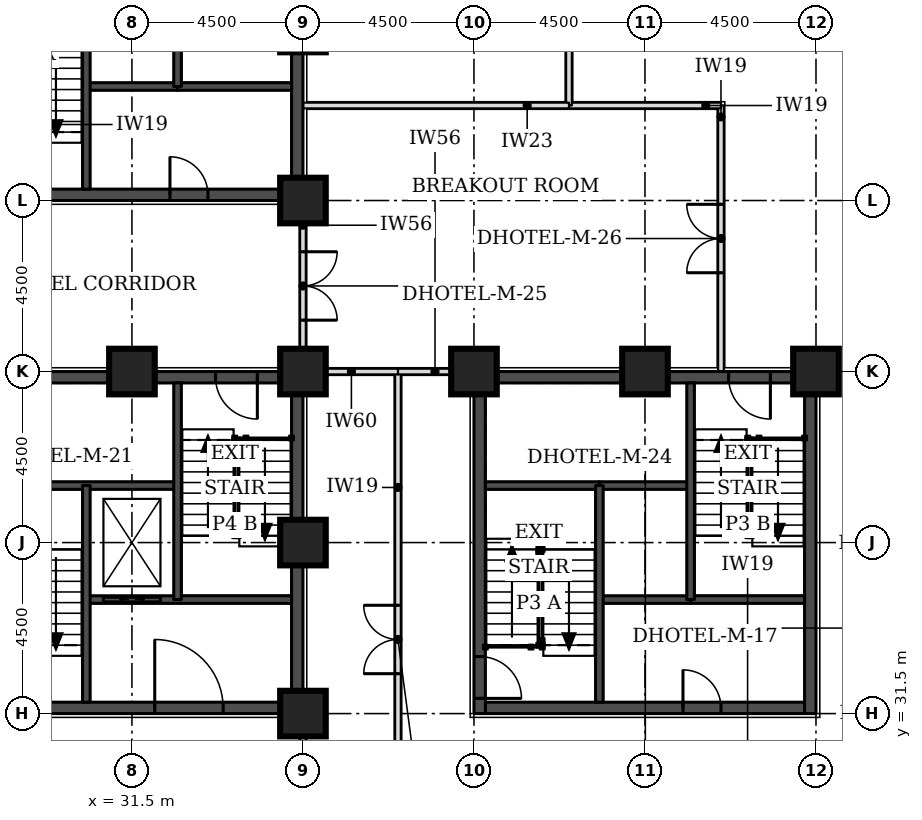
"""IFC4 building model, lengths in metres.
Left out: names, types, materials, properties, quantities, classifications, styles, units other than length and angle.
Written with IfcOpenShell. Run it as: python <this file> out.ifc"""

import sys

from ifc_helpers import new_model, si_unit, direction, frame, frame_2d, origin, origin_2d, place, context, subcontext, project, spatial, rectangle, extrude, element, fill, save


model = new_model("IFC4")
c1 = context("Model", 3, precision=1e-05, world=origin(), true_north=direction((0.0, 1.0)))
c2 = subcontext(c1, "Body", "Model", "MODEL_VIEW")
j1 = project(units=[si_unit("LENGTHUNIT", "METRE"), si_unit("PLANEANGLEUNIT", "RADIAN")], contexts=[c1])
p1 = place(None, origin())
s1 = spatial("IfcSite", under=j1, at=p1, CompositionType="ELEMENT")
p2 = place(p1, origin())
s2 = spatial("IfcBuilding", under=s1, at=p2, CompositionType="ELEMENT")
p3 = place(p2, frame((0.0, 0.0, 23.1)))
s3 = spatial("IfcBuildingStorey", under=s2, at=p3, CompositionType="ELEMENT", Elevation=23.1)
for number, where, z_axis, x_axis in (
    (1, (36.0, 31.5, 0.0), (0.0, 0.0, 1.0), (1.0, 0.0, 0.0)),
    (2, (36.0, 36.0, 0.0), (0.0, 0.0, 1.0), (1.0, 0.0, 0.0)),
    (3, (31.5, 40.5, 0.0), (0.0, 0.0, 1.0), (1.0, 0.0, 0.0)),
    (4, (36.0, 40.5, 0.0), (0.0, 0.0, 1.0), (1.0, 0.0, 0.0)),
    (5, (40.5, 40.5, 0.0), (0.0, 0.0, 1.0), (1.0, 0.0, 0.0)),
    (6, (45.0, 40.5, 0.0), (0.0, 0.0, 1.0), (1.0, 0.0, 0.0)),
    (7, (49.5, 40.5, 0.0), (0.0, 0.0, 1.0), (1.0, 0.0, 0.0)),
    (8, (36.0, 45.0, 0.0), (0.0, 0.0, 1.0), (1.0, 0.0, 0.0)),
):
    element("IfcColumn", number, at=place(p3, frame(where, z_axis=z_axis, x_axis=x_axis)), inside=s3, PredefinedType="COLUMN", context=c2, shape_type="SweptSolid", body=[
        extrude(rectangle(XDim=1.2, YDim=1.2, at=origin_2d()), origin(), (0.0, 0.0, 1.0), 3.3),
    ])
p4 = place(p3, frame((27.3, 45.15, 0.0), z_axis=(0.0, 0.0, 1.0), x_axis=(1.0, 0.0, 0.0)))
e9 = element("IfcWall", 9, at=p4, inside=s3, PredefinedType="SHEAR", context=c2, shape_type="SweptSolid", body=[
    extrude(rectangle(XDim=8.4, YDim=0.3, at=frame_2d((4.2, 0.0))), origin(), (0.0, 0.0, 1.0), 3.3),
])
p5 = place(p4, frame((5.2, 0.0, 0.0)))
e10 = element("IfcOpeningElement", 10, at=p5, cuts=e9, PredefinedType="OPENING", context=c2, shape_type="SweptSolid", body=[
    extrude(rectangle(XDim=1.0, YDim=2.1, at=frame_2d((0.5, 1.05))), frame((0.0, 0.16, 0.0), z_axis=(0.0, -1.0, 0.0), x_axis=(1.0, 0.0, 0.0)), (0.0, 0.0, 1.0), 0.32),
])
p6 = place(p3, frame((35.85, 45.0, 0.0), z_axis=(0.0, 0.0, 1.0), x_axis=(0.0, 1.0, 0.0)))
e11 = element("IfcWall", 11, at=p6, inside=s3, PredefinedType="SHEAR", context=c2, shape_type="SweptSolid", body=[
    extrude(rectangle(XDim=9.0, YDim=0.3, at=frame_2d((4.5, 0.0))), origin(), (0.0, 0.0, 1.0), 3.3),
])
p7 = place(p3, frame((40.8, 31.65, 0.0), z_axis=(0.0, 0.0, 1.0), x_axis=(1.0, 0.0, 0.0)))
e12 = element("IfcWall", 12, at=p7, inside=s3, PredefinedType="SHEAR", context=c2, shape_type="SweptSolid", body=[
    extrude(rectangle(XDim=8.4, YDim=0.3, at=frame_2d((4.2, 0.0))), origin(), (0.0, 0.0, 1.0), 3.3),
])
p8 = place(p7, frame((5.2, 0.0, 0.0)))
e13 = element("IfcOpeningElement", 13, at=p8, cuts=e12, PredefinedType="OPENING", context=c2, shape_type="SweptSolid", body=[
    extrude(rectangle(XDim=1.0, YDim=2.1, at=frame_2d((0.5, 1.05))), frame((0.0, 0.16, 0.0), z_axis=(0.0, -1.0, 0.0), x_axis=(1.0, 0.0, 0.0)), (0.0, 0.0, 1.0), 0.32),
])
p9 = place(p3, frame((40.8, 40.35, 0.0), z_axis=(0.0, 0.0, 1.0), x_axis=(1.0, 0.0, 0.0)))
e14 = element("IfcWall", 14, at=p9, inside=s3, PredefinedType="SHEAR", context=c2, shape_type="SweptSolid", body=[
    extrude(rectangle(XDim=8.4, YDim=0.3, at=frame_2d((4.2, 0.0))), origin(), (0.0, 0.0, 1.0), 3.3),
])
p10 = place(p9, frame((6.4, 0.0, 0.0)))
e15 = element("IfcOpeningElement", 15, at=p10, cuts=e14, PredefinedType="OPENING", context=c2, shape_type="SweptSolid", body=[
    extrude(rectangle(XDim=1.1, YDim=2.1, at=frame_2d((0.55, 1.05))), frame((0.0, 0.16, 0.0), z_axis=(0.0, -1.0, 0.0), x_axis=(1.0, 0.0, 0.0)), (0.0, 0.0, 1.0), 0.32),
])
p11 = place(p3, frame((40.65, 31.5, 0.0), z_axis=(0.0, 0.0, 1.0), x_axis=(0.0, 1.0, 0.0)))
e16 = element("IfcWall", 16, at=p11, inside=s3, PredefinedType="SHEAR", context=c2, shape_type="SweptSolid", body=[
    extrude(rectangle(XDim=9.0, YDim=0.3, at=frame_2d((4.5, 0.0))), origin(), (0.0, 0.0, 1.0), 3.3),
])
p12 = place(p11, frame((0.4, 0.0, 0.0)))
e17 = element("IfcOpeningElement", 17, at=p12, cuts=e16, PredefinedType="OPENING", context=c2, shape_type="SweptSolid", body=[
    extrude(rectangle(XDim=1.1, YDim=2.1, at=frame_2d((0.55, 1.05))), frame((0.0, 0.16, 0.0), z_axis=(0.0, -1.0, 0.0), x_axis=(1.0, 0.0, 0.0)), (0.0, 0.0, 1.0), 0.32),
])
p13 = place(p3, frame((49.35, 31.5, 0.0), z_axis=(0.0, 0.0, 1.0), x_axis=(0.0, 1.0, 0.0)))
e18 = element("IfcWall", 18, at=p13, inside=s3, PredefinedType="SHEAR", context=c2, shape_type="SweptSolid", body=[
    extrude(rectangle(XDim=9.0, YDim=0.3, at=frame_2d((4.5, 0.0))), origin(), (0.0, 0.0, 1.0), 3.3),
])
p14 = place(p3, frame((27.3, 31.65, 0.0), z_axis=(0.0, 0.0, 1.0), x_axis=(1.0, 0.0, 0.0)))
e19 = element("IfcWall", 19, at=p14, inside=s3, PredefinedType="SHEAR", context=c2, shape_type="SweptSolid", body=[
    extrude(rectangle(XDim=8.4, YDim=0.3, at=frame_2d((4.2, 0.0))), origin(), (0.0, 0.0, 1.0), 3.3),
])
p15 = place(p14, frame((4.8, 0.0, 0.0)))
e20 = element("IfcOpeningElement", 20, at=p15, cuts=e19, PredefinedType="OPENING", context=c2, shape_type="SweptSolid", body=[
    extrude(rectangle(XDim=1.8, YDim=2.1, at=frame_2d((0.9, 1.05))), frame((0.0, 0.16, 0.0), z_axis=(0.0, -1.0, 0.0), x_axis=(1.0, 0.0, 0.0)), (0.0, 0.0, 1.0), 0.32),
])
p16 = place(p3, frame((27.3, 40.35, 0.0), z_axis=(0.0, 0.0, 1.0), x_axis=(1.0, 0.0, 0.0)))
e21 = element("IfcWall", 21, at=p16, inside=s3, PredefinedType="SHEAR", context=c2, shape_type="SweptSolid", body=[
    extrude(rectangle(XDim=8.4, YDim=0.3, at=frame_2d((4.2, 0.0))), origin(), (0.0, 0.0, 1.0), 3.3),
])
p17 = place(p16, frame((6.4, 0.0, 0.0)))
e22 = element("IfcOpeningElement", 22, at=p17, cuts=e21, PredefinedType="OPENING", context=c2, shape_type="SweptSolid", body=[
    extrude(rectangle(XDim=1.1, YDim=2.1, at=frame_2d((0.55, 1.05))), frame((0.0, 0.16, 0.0), z_axis=(0.0, -1.0, 0.0), x_axis=(1.0, 0.0, 0.0)), (0.0, 0.0, 1.0), 0.32),
])
p18 = place(p3, frame((35.85, 31.5, 0.0), z_axis=(0.0, 0.0, 1.0), x_axis=(0.0, 1.0, 0.0)))
e23 = element("IfcWall", 23, at=p18, inside=s3, PredefinedType="SHEAR", context=c2, shape_type="SweptSolid", body=[
    extrude(rectangle(XDim=9.0, YDim=0.3, at=frame_2d((4.5, 0.0))), origin(), (0.0, 0.0, 1.0), 3.3),
])
p19 = place(p3, frame((38.5, 26.4, 0.0), z_axis=(0.0, 0.0, 1.0), x_axis=(0.0, 1.0, 0.0)))
e24 = element("IfcWall", 24, at=p19, inside=s3, PredefinedType="PARTITIONING", context=c2, shape_type="SweptSolid", body=[
    extrude(rectangle(XDim=14.1, YDim=0.15, at=frame_2d((7.05, 0.0))), origin(), (0.0, 0.0, 1.0), 3.08),
])
p20 = place(p19, frame((6.15, 0.0, 0.0)))
e25 = element("IfcOpeningElement", 25, at=p20, cuts=e24, PredefinedType="OPENING", context=c2, shape_type="SweptSolid", body=[
    extrude(rectangle(XDim=1.8, YDim=2.1, at=frame_2d((0.9, 1.05))), frame((0.0, 0.085, 0.0), z_axis=(0.0, -1.0, 0.0), x_axis=(1.0, 0.0, 0.0)), (0.0, 0.0, 1.0), 0.17),
])
for number, where, z_axis, x_axis in (
    (26, (36.0, 29.5, 0.0), (0.0, 0.0, 1.0), (0.0, 1.0, 0.0)),
    (27, (38.5, 40.5, 0.0), (0.0, 0.0, 1.0), (1.0, 0.0, 0.0)),
):
    element("IfcWall", number, at=place(p3, frame(where, z_axis=z_axis, x_axis=x_axis)), inside=s3, PredefinedType="PARTITIONING", context=c2, shape_type="SweptSolid", body=[
        extrude(rectangle(XDim=1.95, YDim=0.15, at=frame_2d((0.975, 0.0))), origin(), (0.0, 0.0, 1.0), 2.33),
    ])
p21 = place(p3, frame((36.0, 40.55, 0.0), z_axis=(0.0, 0.0, 1.0), x_axis=(0.0, 1.0, 0.0)))
e28 = element("IfcWall", 28, at=p21, inside=s3, PredefinedType="PARTITIONING", context=c2, shape_type="SweptSolid", body=[
    extrude(rectangle(XDim=4.4, YDim=0.15, at=frame_2d((2.2, 0.0))), origin(), (0.0, 0.0, 1.0), 2.33),
])
p22 = place(p21, frame((1.302, 0.0, 0.0)))
e29 = element("IfcOpeningElement", 29, at=p22, cuts=e28, PredefinedType="OPENING", context=c2, shape_type="SweptSolid", body=[
    extrude(rectangle(XDim=1.8, YDim=2.1, at=frame_2d((0.9, 1.05))), frame((0.0, 0.085, 0.0), z_axis=(0.0, -1.0, 0.0), x_axis=(1.0, 0.0, 0.0)), (0.0, 0.0, 1.0), 0.17),
])
p23 = place(p3, frame((47.0, 40.5, 0.0), z_axis=(0.0, 0.0, 1.0), x_axis=(0.0, 1.0, 0.0)))
e30 = element("IfcWall", 30, at=p23, inside=s3, PredefinedType="PARTITIONING", context=c2, shape_type="SweptSolid", body=[
    extrude(rectangle(XDim=7.0, YDim=0.15, at=frame_2d((3.5, 0.0))), origin(), (0.0, 0.0, 1.0), 3.08),
])
p24 = place(p23, frame((2.6, 0.0, 0.0)))
e31 = element("IfcOpeningElement", 31, at=p24, cuts=e30, PredefinedType="OPENING", context=c2, shape_type="SweptSolid", body=[
    extrude(rectangle(XDim=1.8, YDim=2.1, at=frame_2d((0.9, 1.05))), frame((0.0, 0.085, 0.0), z_axis=(0.0, -1.0, 0.0), x_axis=(1.0, 0.0, 0.0)), (0.0, 0.0, 1.0), 0.17),
])
p25 = place(p3, frame((43.0, 47.5, 0.0), z_axis=(0.0, 0.0, 1.0), x_axis=(1.0, 0.0, 0.0)))
e32 = element("IfcWall", 32, at=p25, inside=s3, PredefinedType="PARTITIONING", context=c2, shape_type="SweptSolid", body=[
    extrude(rectangle(XDim=4.0, YDim=0.15, at=frame_2d((2.0, 0.0))), origin(), (0.0, 0.0, 1.0), 3.08),
])
p26 = place(p3, frame((43.0, 47.5, 0.0), z_axis=(0.0, 0.0, 1.0), x_axis=(0.0, 1.0, 0.0)))
e33 = element("IfcWall", 33, at=p26, inside=s3, PredefinedType="PARTITIONING", context=c2, shape_type="SweptSolid", body=[
    extrude(rectangle(XDim=7.1, YDim=0.15, at=frame_2d((3.55, 0.0))), origin(), (0.0, 0.0, 1.0), 3.08),
])
p27 = place(p26, frame((3.1, 0.0, 0.0)))
e34 = element("IfcOpeningElement", 34, at=p27, cuts=e33, PredefinedType="OPENING", context=c2, shape_type="SweptSolid", body=[
    extrude(rectangle(XDim=0.9, YDim=2.1, at=frame_2d((0.45, 1.05))), frame((0.0, 0.085, 0.0), z_axis=(0.0, -1.0, 0.0), x_axis=(1.0, 0.0, 0.0)), (0.0, 0.0, 1.0), 0.17),
])
p28 = place(p3, frame((36.05, 40.5, 0.0), z_axis=(0.0, 0.0, 1.0), x_axis=(1.0, 0.0, 0.0)))
e35 = element("IfcWall", 35, at=p28, inside=s3, PredefinedType="PARTITIONING", context=c2, shape_type="SweptSolid", body=[
    extrude(rectangle(XDim=2.45, YDim=0.15, at=frame_2d((1.225, 0.0))), origin(), (0.0, 0.0, 1.0), 2.33),
])
p29 = place(p3, frame((36.0, 47.5, 0.0), z_axis=(0.0, 0.0, 1.0), x_axis=(1.0, 0.0, 0.0)))
e36 = element("IfcWall", 36, at=p29, inside=s3, PredefinedType="PARTITIONING", context=c2, shape_type="SweptSolid", body=[
    extrude(rectangle(XDim=7.0, YDim=0.15, at=frame_2d((3.5, 0.0))), origin(), (0.0, 0.0, 1.0), 3.08),
])
p30 = place(p3, frame((30.3, 48.0, 0.0), z_axis=(0.0, 0.0, 1.0), x_axis=(1.0, 0.0, 0.0)))
e37 = element("IfcWall", 37, at=p30, inside=s3, PredefinedType="SOLIDWALL", context=c2, shape_type="SweptSolid", body=[
    extrude(rectangle(XDim=2.4, YDim=0.2, at=frame_2d((1.2, 0.0))), origin(), (0.0, 0.0, 1.0), 3.08),
])
p31 = place(p3, frame((32.7, 48.0, 0.0), z_axis=(0.0, 0.0, 1.0), x_axis=(1.0, 0.0, 0.0)))
e38 = element("IfcWall", 38, at=p31, inside=s3, PredefinedType="SOLIDWALL", context=c2, shape_type="SweptSolid", body=[
    extrude(rectangle(XDim=3.0, YDim=0.2, at=frame_2d((1.5, 0.0))), origin(), (0.0, 0.0, 1.0), 3.08),
])
for number, where, z_axis, x_axis in (
    (39, (30.3, 45.3, 0.0), (0.0, 0.0, 1.0), (0.0, 1.0, 0.0)),
    (40, (32.7, 48.0, 0.0), (0.0, 0.0, 1.0), (0.0, 1.0, 0.0)),
):
    element("IfcWall", number, at=place(p3, frame(where, z_axis=z_axis, x_axis=x_axis)), inside=s3, PredefinedType="SOLIDWALL", context=c2, shape_type="SweptSolid", body=[
        extrude(rectangle(XDim=5.7, YDim=0.2, at=frame_2d((2.85, 0.0))), origin(), (0.0, 0.0, 1.0), 3.08),
    ])
p32 = place(p3, frame((43.8, 34.5, 0.0), z_axis=(0.0, 0.0, 1.0), x_axis=(1.0, 0.0, 0.0)))
e41 = element("IfcWall", 41, at=p32, inside=s3, PredefinedType="SOLIDWALL", context=c2, shape_type="SweptSolid", body=[
    extrude(rectangle(XDim=2.4, YDim=0.2, at=frame_2d((1.2, 0.0))), origin(), (0.0, 0.0, 1.0), 3.08),
])
p33 = place(p3, frame((46.2, 34.5, 0.0), z_axis=(0.0, 0.0, 1.0), x_axis=(1.0, 0.0, 0.0)))
e42 = element("IfcWall", 42, at=p33, inside=s3, PredefinedType="SOLIDWALL", context=c2, shape_type="SweptSolid", body=[
    extrude(rectangle(XDim=3.0, YDim=0.2, at=frame_2d((1.5, 0.0))), origin(), (0.0, 0.0, 1.0), 3.08),
])
p34 = place(p3, frame((43.8, 37.5, 0.0), z_axis=(0.0, 0.0, 1.0), x_axis=(1.0, 0.0, 0.0)))
e43 = element("IfcWall", 43, at=p34, inside=s3, PredefinedType="SOLIDWALL", context=c2, shape_type="SweptSolid", body=[
    extrude(rectangle(XDim=2.4, YDim=0.2, at=frame_2d((1.2, 0.0))), origin(), (0.0, 0.0, 1.0), 3.3),
])
p35 = place(p3, frame((40.8, 37.5, 0.0), z_axis=(0.0, 0.0, 1.0), x_axis=(1.0, 0.0, 0.0)))
e44 = element("IfcWall", 44, at=p35, inside=s3, PredefinedType="SOLIDWALL", context=c2, shape_type="SweptSolid", body=[
    extrude(rectangle(XDim=3.0, YDim=0.2, at=frame_2d((1.5, 0.0))), origin(), (0.0, 0.0, 1.0), 3.08),
])
for number, where, z_axis, x_axis in (
    (45, (43.8, 31.8, 0.0), (0.0, 0.0, 1.0), (0.0, 1.0, 0.0)),
    (46, (46.2, 34.5, 0.0), (0.0, 0.0, 1.0), (0.0, 1.0, 0.0)),
):
    element("IfcWall", number, at=place(p3, frame(where, z_axis=z_axis, x_axis=x_axis)), inside=s3, PredefinedType="SOLIDWALL", context=c2, shape_type="SweptSolid", body=[
        extrude(rectangle(XDim=5.7, YDim=0.2, at=frame_2d((2.85, 0.0))), origin(), (0.0, 0.0, 1.0), 3.08),
    ])
p36 = place(p3, frame((30.3, 34.5, 0.0), z_axis=(0.0, 0.0, 1.0), x_axis=(1.0, 0.0, 0.0)))
e47 = element("IfcWall", 47, at=p36, inside=s3, PredefinedType="SOLIDWALL", context=c2, shape_type="SweptSolid", body=[
    extrude(rectangle(XDim=5.4, YDim=0.2, at=frame_2d((2.7, 0.0))), origin(), (0.0, 0.0, 1.0), 3.08),
])
p37 = place(p36, frame((0.45, 0.0, 0.0)))
e48 = element("IfcOpeningElement", 48, at=p37, cuts=e47, PredefinedType="OPENING", context=c2, shape_type="SweptSolid", body=[
    extrude(rectangle(XDim=1.5, YDim=2.1, at=frame_2d((0.75, 1.05))), frame((0.0, 0.11, 0.0), z_axis=(0.0, -1.0, 0.0), x_axis=(1.0, 0.0, 0.0)), (0.0, 0.0, 1.0), 0.22),
])
p38 = place(p3, frame((27.3, 37.5, 0.0), z_axis=(0.0, 0.0, 1.0), x_axis=(1.0, 0.0, 0.0)))
e49 = element("IfcWall", 49, at=p38, inside=s3, PredefinedType="SOLIDWALL", context=c2, shape_type="SweptSolid", body=[
    extrude(rectangle(XDim=5.4, YDim=0.2, at=frame_2d((2.7, 0.0))), origin(), (0.0, 0.0, 1.0), 3.08),
])
for number, where, z_axis, x_axis in (
    (50, (30.3, 31.8, 0.0), (0.0, 0.0, 1.0), (0.0, 1.0, 0.0)),
    (51, (32.7, 34.5, 0.0), (0.0, 0.0, 1.0), (0.0, 1.0, 0.0)),
):
    element("IfcWall", number, at=place(p3, frame(where, z_axis=z_axis, x_axis=x_axis)), inside=s3, PredefinedType="SOLIDWALL", context=c2, shape_type="SweptSolid", body=[
        extrude(rectangle(XDim=5.7, YDim=0.2, at=frame_2d((2.85, 0.0))), origin(), (0.0, 0.0, 1.0), 3.08),
    ])
p39 = place(p20, origin())
e52 = element("IfcDoor", 52, at=p39, inside=s3, OperationType="DOUBLE_DOOR_SINGLE_SWING", PredefinedType="DOOR", context=c2, shape_type="SweptSolid", body=[
    extrude(rectangle(XDim=1.8, YDim=2.1, at=frame_2d((0.9, 1.05))), frame((0.0, 0.025, 0.0), z_axis=(0.0, -1.0, 0.0), x_axis=(1.0, 0.0, 0.0)), (0.0, 0.0, 1.0), 0.05),
])
fill(e25, e52)
p40 = place(p24, origin())
e53 = element("IfcDoor", 53, at=p40, inside=s3, OperationType="DOUBLE_DOOR_SINGLE_SWING", PredefinedType="DOOR", context=c2, shape_type="SweptSolid", body=[
    extrude(rectangle(XDim=1.8, YDim=2.1, at=frame_2d((0.9, 1.05))), frame((0.0, 0.025, 0.0), z_axis=(0.0, -1.0, 0.0), x_axis=(1.0, 0.0, 0.0)), (0.0, 0.0, 1.0), 0.05),
])
fill(e31, e53)
p41 = place(p22, frame((1.8, 0.0, 0.0), z_axis=(0.0, 0.0, 1.0), x_axis=(-1.0, 0.0, 0.0)))
e54 = element("IfcDoor", 54, at=p41, inside=s3, OperationType="DOUBLE_DOOR_SINGLE_SWING", PredefinedType="DOOR", context=c2, shape_type="SweptSolid", body=[
    extrude(rectangle(XDim=1.8, YDim=2.1, at=frame_2d((0.9, 1.05))), frame((0.0, 0.025, 0.0), z_axis=(0.0, -1.0, 0.0), x_axis=(1.0, 0.0, 0.0)), (0.0, 0.0, 1.0), 0.05),
])
fill(e29, e54)
p42 = place(p5, origin())
e55 = element("IfcDoor", 55, at=p42, inside=s3, OperationType="SINGLE_SWING_LEFT", PredefinedType="DOOR", context=c2, shape_type="SweptSolid", body=[
    extrude(rectangle(XDim=1.0, YDim=2.1, at=frame_2d((0.5, 1.05))), frame((0.0, 0.025, 0.0), z_axis=(0.0, -1.0, 0.0), x_axis=(1.0, 0.0, 0.0)), (0.0, 0.0, 1.0), 0.05),
])
fill(e10, e55)
p43 = place(p12, frame((1.1, 0.0, 0.0), z_axis=(0.0, 0.0, 1.0), x_axis=(-1.0, 0.0, 0.0)))
e56 = element("IfcDoor", 56, at=p43, inside=s3, OperationType="SINGLE_SWING_RIGHT", PredefinedType="DOOR", context=c2, shape_type="SweptSolid", body=[
    extrude(rectangle(XDim=1.1, YDim=2.1, at=frame_2d((0.55, 1.05))), frame((0.0, 0.025, 0.0), z_axis=(0.0, -1.0, 0.0), x_axis=(1.0, 0.0, 0.0)), (0.0, 0.0, 1.0), 0.05),
])
fill(e17, e56)
p44 = place(p10, frame((1.1, 0.0, 0.0), z_axis=(0.0, 0.0, 1.0), x_axis=(-1.0, 0.0, 0.0)))
e57 = element("IfcDoor", 57, at=p44, inside=s3, OperationType="SINGLE_SWING_LEFT", PredefinedType="DOOR", context=c2, shape_type="SweptSolid", body=[
    extrude(rectangle(XDim=1.1, YDim=2.1, at=frame_2d((0.55, 1.05))), frame((0.0, 0.025, 0.0), z_axis=(0.0, -1.0, 0.0), x_axis=(1.0, 0.0, 0.0)), (0.0, 0.0, 1.0), 0.05),
])
fill(e15, e57)
p45 = place(p8, origin())
e58 = element("IfcDoor", 58, at=p45, inside=s3, OperationType="SINGLE_SWING_LEFT", PredefinedType="DOOR", context=c2, shape_type="SweptSolid", body=[
    extrude(rectangle(XDim=1.0, YDim=2.1, at=frame_2d((0.5, 1.05))), frame((0.0, 0.025, 0.0), z_axis=(0.0, -1.0, 0.0), x_axis=(1.0, 0.0, 0.0)), (0.0, 0.0, 1.0), 0.05),
])
fill(e13, e58)
p46 = place(p17, frame((1.1, 0.0, 0.0), z_axis=(0.0, 0.0, 1.0), x_axis=(-1.0, 0.0, 0.0)))
e59 = element("IfcDoor", 59, at=p46, inside=s3, OperationType="SINGLE_SWING_LEFT", PredefinedType="DOOR", context=c2, shape_type="SweptSolid", body=[
    extrude(rectangle(XDim=1.1, YDim=2.1, at=frame_2d((0.55, 1.05))), frame((0.0, 0.025, 0.0), z_axis=(0.0, -1.0, 0.0), x_axis=(1.0, 0.0, 0.0)), (0.0, 0.0, 1.0), 0.05),
])
fill(e22, e59)
p47 = place(p37, origin())
e60 = element("IfcDoor", 60, at=p47, inside=s3, OperationType="DOUBLE_DOOR_SLIDING", PredefinedType="DOOR", context=c2, shape_type="SweptSolid", body=[
    extrude(rectangle(XDim=1.5, YDim=2.1, at=frame_2d((0.75, 1.05))), frame((0.0, 0.025, 0.0), z_axis=(0.0, -1.0, 0.0), x_axis=(1.0, 0.0, 0.0)), (0.0, 0.0, 1.0), 0.05),
])
fill(e48, e60)
p48 = place(p15, origin())
e61 = element("IfcDoor", 61, at=p48, inside=s3, OperationType="SINGLE_SWING_LEFT", PredefinedType="DOOR", context=c2, shape_type="SweptSolid", body=[
    extrude(rectangle(XDim=1.8, YDim=2.1, at=frame_2d((0.9, 1.05))), frame((0.0, 0.025, 0.0), z_axis=(0.0, -1.0, 0.0), x_axis=(1.0, 0.0, 0.0)), (0.0, 0.0, 1.0), 0.05),
])
fill(e20, e61)
save(model, sys.argv[1])
